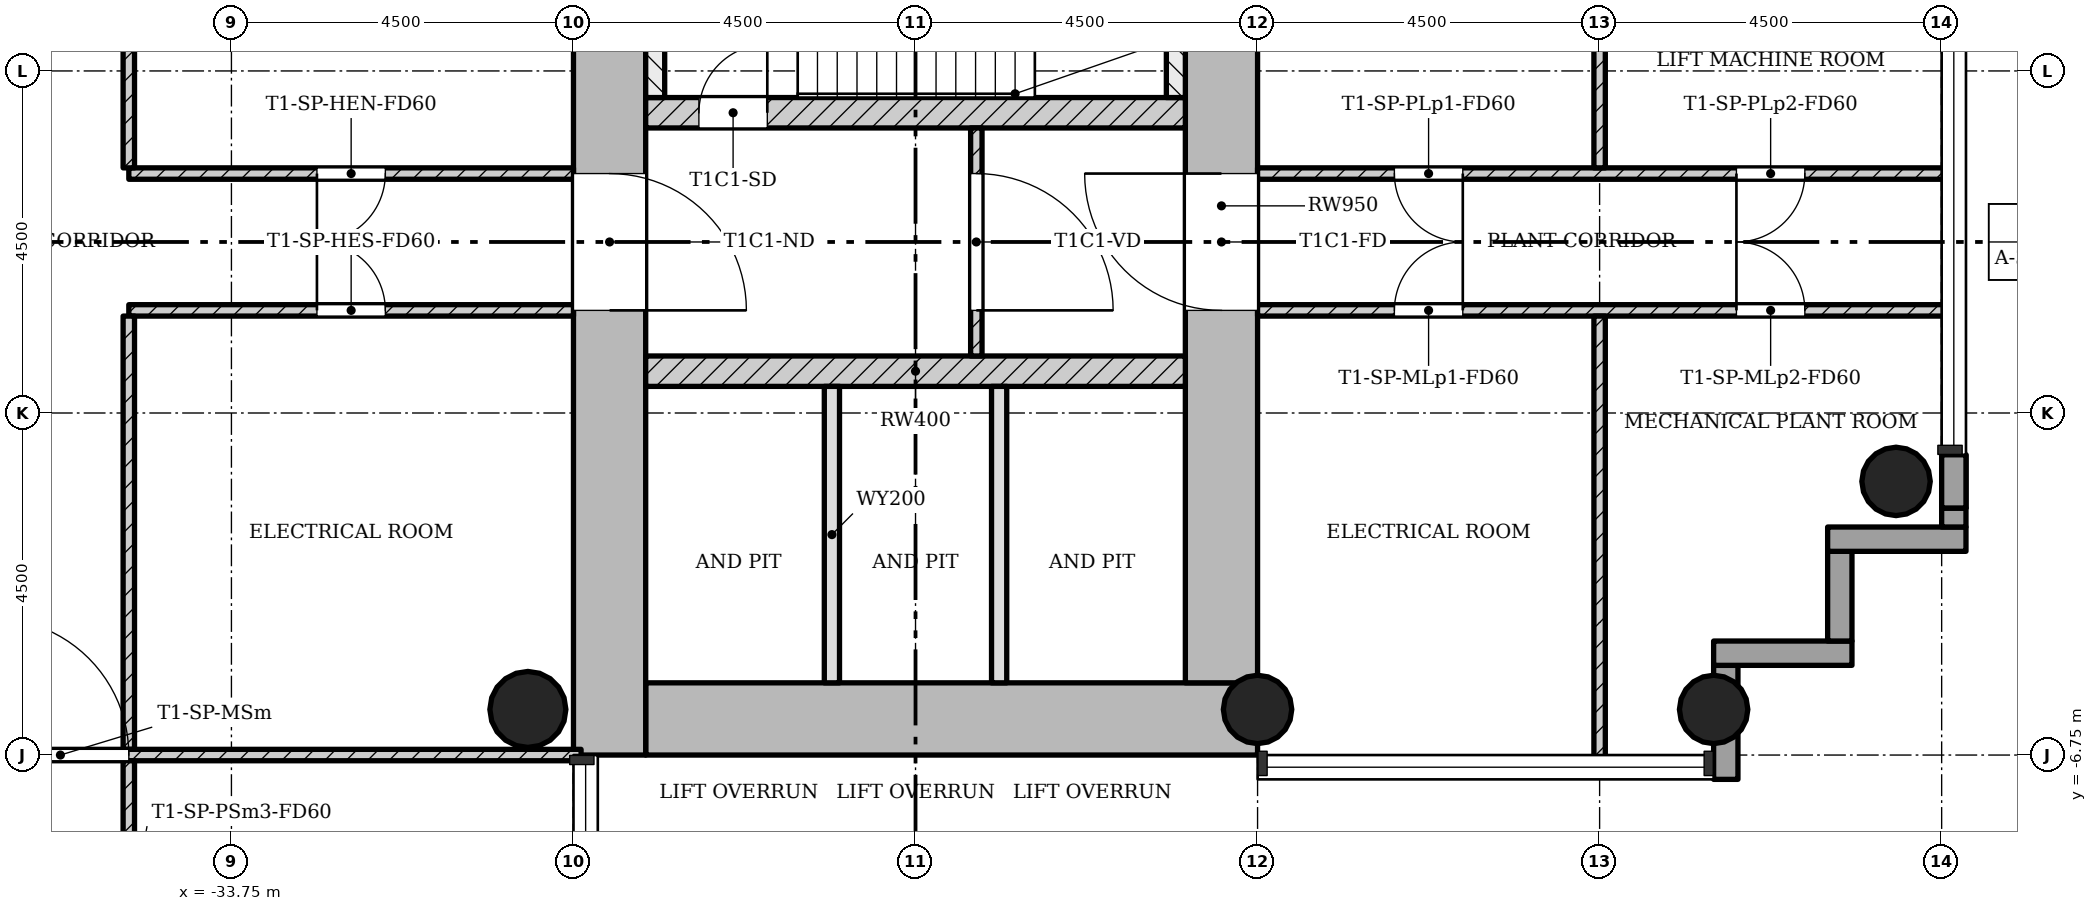
"""IFC4 building model, lengths in metres.
Left out: names, types, materials, properties, quantities, classifications, styles, units other than length and angle.
Written with IfcOpenShell. Run it as: python <this file> out.ifc"""

import sys

from ifc_helpers import new_model, si_unit, direction, frame, frame_2d, origin, origin_2d, place, context, subcontext, project, spatial, rectangle, hollow_circle, extrude, element, fill, save


model = new_model("IFC4")
c1 = context("Model", 3, precision=1e-05, world=origin(), true_north=direction((0.0, 1.0)))
c2 = subcontext(c1, "Body", "Model", "MODEL_VIEW")
j1 = project(units=[si_unit("LENGTHUNIT", "METRE"), si_unit("PLANEANGLEUNIT", "RADIAN")], contexts=[c1])
p1 = place(None, origin())
s1 = spatial("IfcSite", under=j1, at=p1, CompositionType="ELEMENT")
p2 = place(p1, origin())
s2 = spatial("IfcBuilding", under=s1, at=p2, CompositionType="ELEMENT")
p3 = place(p2, frame((0.0, 0.0, 124.2)))
s3 = spatial("IfcBuildingStorey", under=s2, at=p3, CompositionType="ELEMENT", Elevation=124.2)
p4 = place(p3, frame((-28.3, -6.275, 0.0), z_axis=(0.0, 0.0, 1.0), x_axis=(1.0, 0.0, 0.0)))
e1 = element("IfcWall", 1, at=p4, inside=s3, PredefinedType="SHEAR", context=c2, shape_type="SweptSolid", body=[
    extrude(rectangle(XDim=8.05, YDim=0.95, at=frame_2d((4.025, 0.0))), origin(), (0.0, 0.0, 1.0), 4.5),
])
p5 = place(p3, frame((-20.725, -5.8, 0.0), z_axis=(0.0, 0.0, 1.0), x_axis=(0.0, 1.0, 0.0)))
e2 = element("IfcWall", 2, at=p5, inside=s3, PredefinedType="SHEAR", context=c2, shape_type="SweptSolid", body=[
    extrude(rectangle(XDim=12.55, YDim=0.95, at=frame_2d((6.275, 0.0))), origin(), (0.0, 0.0, 1.0), 4.5),
])
p6 = place(p5, frame((4.9, 0.0, 0.0)))
e3 = element("IfcOpeningElement", 3, at=p6, cuts=e2, PredefinedType="OPENING", context=c2, shape_type="SweptSolid", body=[
    extrude(rectangle(XDim=1.8, YDim=2.1, at=frame_2d((0.9, 1.05))), frame((0.0, 0.485, 0.0), z_axis=(0.0, -1.0, 0.0), x_axis=(1.0, 0.0, 0.0)), (0.0, 0.0, 1.0), 0.97),
])
p7 = place(p3, frame((-28.775, 5.8, 0.0), z_axis=(0.0, 0.0, 1.0), x_axis=(0.0, -1.0, 0.0)))
e4 = element("IfcWall", 4, at=p7, inside=s3, PredefinedType="SHEAR", context=c2, shape_type="SweptSolid", body=[
    extrude(rectangle(XDim=12.55, YDim=0.95, at=frame_2d((6.275, 0.0))), origin(), (0.0, 0.0, 1.0), 4.5),
])
p8 = place(p7, frame((4.9, 0.0, 0.0)))
e5 = element("IfcOpeningElement", 5, at=p8, cuts=e4, PredefinedType="OPENING", context=c2, shape_type="SweptSolid", body=[
    extrude(rectangle(XDim=1.8, YDim=2.1, at=frame_2d((0.9, 1.05))), frame((0.0, 0.485, 0.0), z_axis=(0.0, -1.0, 0.0), x_axis=(1.0, 0.0, 0.0)), (0.0, 0.0, 1.0), 0.97),
])
p9 = place(p3, frame((-28.3, -1.7, 0.0), z_axis=(0.0, 0.0, 1.0), x_axis=(1.0, 0.0, 0.0)))
e6 = element("IfcWall", 6, at=p9, inside=s3, PredefinedType="SHEAR", context=c2, shape_type="SweptSolid", body=[
    extrude(rectangle(XDim=7.1, YDim=0.4, at=frame_2d((3.55, 0.0))), origin(), (0.0, 0.0, 1.0), 4.5),
])
p10 = place(p3, frame((-28.3, 1.7, 0.0), z_axis=(0.0, 0.0, 1.0), x_axis=(1.0, 0.0, 0.0)))
e7 = element("IfcWall", 7, at=p10, inside=s3, PredefinedType="SHEAR", context=c2, shape_type="SweptSolid", body=[
    extrude(rectangle(XDim=7.1, YDim=0.4, at=frame_2d((3.55, 0.0))), origin(), (0.0, 0.0, 1.0), 4.5),
])
p11 = place(p10, frame((0.7, 0.0, 0.0)))
e8 = element("IfcOpeningElement", 8, at=p11, cuts=e7, PredefinedType="OPENING", context=c2, shape_type="SweptSolid", body=[
    extrude(rectangle(XDim=0.9, YDim=2.1, at=frame_2d((0.45, 1.05))), frame((0.0, 0.21, 0.0), z_axis=(0.0, -1.0, 0.0), x_axis=(1.0, 0.0, 0.0)), (0.0, 0.0, 1.0), 0.42),
])
for number, where, z_axis, x_axis in (
    (9, (-20.25, -6.15, 0.0), (0.0, 0.0, 1.0), (1.0, 0.0, 0.0)),
    (10, (-14.25, -6.15, 0.0), (0.0, 0.0, 1.0), (1.0, 0.0, 0.0)),
    (11, (-11.85, -3.15, 0.0), (0.0, 0.0, 1.0), (1.0, 0.0, 0.0)),
):
    element("IfcColumn", number, at=place(p3, frame(where, z_axis=z_axis, x_axis=x_axis)), inside=s3, PredefinedType="COLUMN", context=c2, shape_type="SweptSolid", body=[
        extrude(hollow_circle(Radius=0.45, WallThickness=0.032, at=origin_2d()), origin(), (0.0, 0.0, 1.0), 4.5),
    ])
p12 = place(p3, frame((-29.85, -6.15, 0.0), z_axis=(0.0, 0.0, 1.0), x_axis=(1.0, 0.0, 0.0)))
e12 = element("IfcColumn", 12, at=p12, inside=s3, PredefinedType="COLUMN", context=c2, shape_type="SweptSolid", body=[
    extrude(hollow_circle(Radius=0.5, WallThickness=0.036, at=origin_2d()), origin(), (0.0, 0.0, 1.0), 4.5),
])
p13 = place(p3, frame((-14.09, -7.07, -0.3), z_axis=(0.0, 0.0, 1.0), x_axis=(0.0, 1.0, 0.0)))
e13 = element("IfcWall", 13, at=p13, inside=s3, PredefinedType="STANDARD", context=c2, shape_type="SweptSolid", body=[
    extrude(rectangle(XDim=1.5, YDim=0.32, at=frame_2d((0.75, 0.0))), origin(), (0.0, 0.0, 1.0), 4.5),
])
p14 = place(p3, frame((-14.25, -5.41, -0.3), z_axis=(0.0, 0.0, 1.0), x_axis=(1.0, 0.0, 0.0)))
e14 = element("IfcWall", 14, at=p14, inside=s3, PredefinedType="STANDARD", context=c2, shape_type="SweptSolid", body=[
    extrude(rectangle(XDim=1.82, YDim=0.32, at=frame_2d((0.91, 0.0))), origin(), (0.0, 0.0, 1.0), 4.5),
])
p15 = place(p3, frame((-12.59, -5.25, -0.3), z_axis=(0.0, 0.0, 1.0), x_axis=(0.0, 1.0, 0.0)))
e15 = element("IfcWall", 15, at=p15, inside=s3, PredefinedType="STANDARD", context=c2, shape_type="SweptSolid", body=[
    extrude(rectangle(XDim=1.18, YDim=0.32, at=frame_2d((0.59, 0.0))), origin(), (0.0, 0.0, 1.0), 4.5),
])
p16 = place(p3, frame((-12.75, -3.91, -0.3), z_axis=(0.0, 0.0, 1.0), x_axis=(1.0, 0.0, 0.0)))
e16 = element("IfcWall", 16, at=p16, inside=s3, PredefinedType="STANDARD", context=c2, shape_type="SweptSolid", body=[
    extrude(rectangle(XDim=1.82, YDim=0.32, at=frame_2d((0.91, 0.0))), origin(), (0.0, 0.0, 1.0), 4.5),
])
p17 = place(p3, frame((-11.09, -3.75, 0.0), z_axis=(0.0, 0.0, 1.0), x_axis=(0.0, 1.0, 0.0)))
e17 = element("IfcWall", 17, at=p17, inside=s3, PredefinedType="STANDARD", context=c2, shape_type="SweptSolid", body=[
    extrude(rectangle(XDim=0.25, YDim=0.32, at=frame_2d((0.125, 0.0))), origin(), (0.0, 0.0, 1.0), 4.2),
])
p18 = place(p3, frame((-11.09, -3.5, 0.0), z_axis=(0.0, 0.0, 1.0), x_axis=(0.0, 1.0, 0.0)))
e18 = element("IfcWall", 18, at=p18, inside=s3, PredefinedType="STANDARD", context=c2, shape_type="SweptSolid", body=[
    extrude(rectangle(XDim=0.7, YDim=0.32, at=frame_2d((0.35, 0.0))), origin(), (0.0, 0.0, 1.0), 3.61),
])
p19 = place(p3, frame((-11.09, -3.5, 4.08), z_axis=(0.0, 0.0, 1.0), x_axis=(0.0, 1.0, 0.0)))
e19 = element("IfcWall", 19, at=p19, inside=s3, PredefinedType="STANDARD", context=c2, shape_type="SweptSolid", body=[
    extrude(rectangle(XDim=0.7, YDim=0.32, at=frame_2d((0.35, 0.0))), origin(), (0.0, 0.0, 1.0), 0.12),
])
p20 = place(p3, frame((-23.95, -1.5, 0.0), z_axis=(0.0, 0.0, 1.0), x_axis=(0.0, 1.0, 0.0)))
e20 = element("IfcWall", 20, at=p20, inside=s3, PredefinedType="PARTITIONING", context=c2, shape_type="SweptSolid", body=[
    extrude(rectangle(XDim=3.0, YDim=0.15, at=frame_2d((1.5, 0.0))), origin(), (0.0, 0.0, 1.0), 4.1),
])
p21 = place(p20, frame((0.6, 0.0, 0.0)))
e21 = element("IfcOpeningElement", 21, at=p21, cuts=e20, PredefinedType="OPENING", context=c2, shape_type="SweptSolid", body=[
    extrude(rectangle(XDim=1.8, YDim=2.1, at=frame_2d((0.9, 1.05))), frame((0.0, 0.085, 0.0), z_axis=(0.0, -1.0, 0.0), x_axis=(1.0, 0.0, 0.0)), (0.0, 0.0, 1.0), 0.17),
])
for number, where, z_axis, x_axis in (
    (22, (-25.85, -5.8, 0.0), (0.0, 0.0, 1.0), (0.0, 1.0, 0.0)),
    (23, (-23.65, -5.8, 0.0), (0.0, 0.0, 1.0), (0.0, 1.0, 0.0)),
):
    element("IfcWall", number, at=place(p3, frame(where, z_axis=z_axis, x_axis=x_axis)), inside=s3, PredefinedType="SOLIDWALL", context=c2, shape_type="SweptSolid", body=[
        extrude(rectangle(XDim=3.9, YDim=0.2, at=frame_2d((1.95, 0.0))), origin(), (0.0, 0.0, 1.0), 4.1),
    ])
p22 = place(p3, frame((-35.1, 0.9, 0.0), z_axis=(0.0, 0.0, 1.0), x_axis=(1.0, 0.0, 0.0)))
e24 = element("IfcWall", 24, at=p22, inside=s3, PredefinedType="PARTITIONING", context=c2, shape_type="SweptSolid", body=[
    extrude(rectangle(XDim=5.85, YDim=0.15, at=frame_2d((2.925, 0.0))), origin(), (0.0, 0.0, 1.0), 4.1),
])
p23 = place(p22, frame((2.475, 0.0, 0.0)))
e25 = element("IfcOpeningElement", 25, at=p23, cuts=e24, PredefinedType="OPENING", context=c2, shape_type="SweptSolid", body=[
    extrude(rectangle(XDim=0.9, YDim=2.1, at=frame_2d((0.45, 1.05))), frame((0.0, 0.085, 0.0), z_axis=(0.0, -1.0, 0.0), x_axis=(1.0, 0.0, 0.0)), (0.0, 0.0, 1.0), 0.17),
])
p24 = place(p3, frame((-35.1, 0.975, 0.0), z_axis=(0.0, 0.0, 1.0), x_axis=(0.0, 1.0, 0.0)))
e26 = element("IfcWall", 26, at=p24, inside=s3, PredefinedType="PARTITIONING", context=c2, shape_type="SweptSolid", body=[
    extrude(rectangle(XDim=5.7, YDim=0.15, at=frame_2d((2.85, 0.0))), origin(), (0.0, 0.0, 1.0), 4.1),
])
p25 = place(p3, frame((-35.1, -0.9, 0.0), z_axis=(0.0, 0.0, 1.0), x_axis=(1.0, 0.0, 0.0)))
e27 = element("IfcWall", 27, at=p25, inside=s3, PredefinedType="PARTITIONING", context=c2, shape_type="SweptSolid", body=[
    extrude(rectangle(XDim=5.85, YDim=0.15, at=frame_2d((2.925, 0.0))), origin(), (0.0, 0.0, 1.0), 4.1),
])
p26 = place(p25, frame((2.475, 0.0, 0.0)))
e28 = element("IfcOpeningElement", 28, at=p26, cuts=e27, PredefinedType="OPENING", context=c2, shape_type="SweptSolid", body=[
    extrude(rectangle(XDim=0.9, YDim=2.1, at=frame_2d((0.45, 1.05))), frame((0.0, 0.085, 0.0), z_axis=(0.0, -1.0, 0.0), x_axis=(1.0, 0.0, 0.0)), (0.0, 0.0, 1.0), 0.17),
])
p27 = place(p3, frame((-35.1, -6.675, 0.0), z_axis=(0.0, 0.0, 1.0), x_axis=(0.0, 1.0, 0.0)))
e29 = element("IfcWall", 29, at=p27, inside=s3, PredefinedType="PARTITIONING", context=c2, shape_type="SweptSolid", body=[
    extrude(rectangle(XDim=5.7, YDim=0.15, at=frame_2d((2.85, 0.0))), origin(), (0.0, 0.0, 1.0), 4.1),
])
p28 = place(p3, frame((-20.25, 0.9, 0.0), z_axis=(0.0, 0.0, 1.0), x_axis=(1.0, 0.0, 0.0)))
e30 = element("IfcWall", 30, at=p28, inside=s3, PredefinedType="PARTITIONING", context=c2, shape_type="SweptSolid", body=[
    extrude(rectangle(XDim=9.1, YDim=0.15, at=frame_2d((4.55, 0.0))), origin(), (0.0, 0.0, 1.0), 4.1),
])
p29 = place(p28, frame((1.8, 0.0, 0.0)))
e31 = element("IfcOpeningElement", 31, at=p29, cuts=e30, PredefinedType="OPENING", context=c2, shape_type="SweptSolid", body=[
    extrude(rectangle(XDim=0.9, YDim=2.1, at=frame_2d((0.45, 1.05))), frame((0.0, 0.085, 0.0), z_axis=(0.0, -1.0, 0.0), x_axis=(1.0, 0.0, 0.0)), (0.0, 0.0, 1.0), 0.17),
])
p30 = place(p28, frame((6.3, 0.0, 0.0)))
e32 = element("IfcOpeningElement", 32, at=p30, cuts=e30, PredefinedType="OPENING", context=c2, shape_type="SweptSolid", body=[
    extrude(rectangle(XDim=0.9, YDim=2.1, at=frame_2d((0.45, 1.05))), frame((0.0, 0.085, 0.0), z_axis=(0.0, -1.0, 0.0), x_axis=(1.0, 0.0, 0.0)), (0.0, 0.0, 1.0), 0.17),
])
p31 = place(p3, frame((-15.75, 0.975, 0.0), z_axis=(0.0, 0.0, 1.0), x_axis=(0.0, 1.0, 0.0)))
e33 = element("IfcWall", 33, at=p31, inside=s3, PredefinedType="PARTITIONING", context=c2, shape_type="SweptSolid", body=[
    extrude(rectangle(XDim=5.875, YDim=0.15, at=frame_2d((2.938, 0.0))), origin(), (0.0, 0.0, 1.0), 4.1),
])
p32 = place(p3, frame((-20.25, -0.9, 0.0), z_axis=(0.0, 0.0, 1.0), x_axis=(1.0, 0.0, 0.0)))
e34 = element("IfcWall", 34, at=p32, inside=s3, PredefinedType="PARTITIONING", context=c2, shape_type="SweptSolid", body=[
    extrude(rectangle(XDim=9.1, YDim=0.15, at=frame_2d((4.55, 0.0))), origin(), (0.0, 0.0, 1.0), 4.1),
])
p33 = place(p32, frame((1.8, 0.0, 0.0)))
e35 = element("IfcOpeningElement", 35, at=p33, cuts=e34, PredefinedType="OPENING", context=c2, shape_type="SweptSolid", body=[
    extrude(rectangle(XDim=0.9, YDim=2.1, at=frame_2d((0.45, 1.05))), frame((0.0, 0.085, 0.0), z_axis=(0.0, -1.0, 0.0), x_axis=(1.0, 0.0, 0.0)), (0.0, 0.0, 1.0), 0.17),
])
p34 = place(p32, frame((6.3, 0.0, 0.0)))
e36 = element("IfcOpeningElement", 36, at=p34, cuts=e34, PredefinedType="OPENING", context=c2, shape_type="SweptSolid", body=[
    extrude(rectangle(XDim=0.9, YDim=2.1, at=frame_2d((0.45, 1.05))), frame((0.0, 0.085, 0.0), z_axis=(0.0, -1.0, 0.0), x_axis=(1.0, 0.0, 0.0)), (0.0, 0.0, 1.0), 0.17),
])
p35 = place(p3, frame((-15.75, -0.975, 0.0), z_axis=(0.0, 0.0, 1.0), x_axis=(0.0, -1.0, 0.0)))
e37 = element("IfcWall", 37, at=p35, inside=s3, PredefinedType="PARTITIONING", context=c2, shape_type="SweptSolid", body=[
    extrude(rectangle(XDim=5.875, YDim=0.15, at=frame_2d((2.938, 0.0))), origin(), (0.0, 0.0, 1.0), 4.1),
])
p36 = place(p3, frame((-42.85, -6.75, 0.0), z_axis=(0.0, 0.0, 1.0), x_axis=(1.0, 0.0, 0.0)))
e38 = element("IfcWall", 38, at=p36, inside=s3, PredefinedType="PARTITIONING", context=c2, shape_type="SweptSolid", body=[
    extrude(rectangle(XDim=13.7, YDim=0.15, at=frame_2d((6.85, 0.0))), origin(), (0.0, 0.0, 1.0), 4.1),
])
p37 = place(p36, frame((5.95, 0.0, 0.0)))
e39 = element("IfcOpeningElement", 39, at=p37, cuts=e38, PredefinedType="OPENING", context=c2, shape_type="SweptSolid", body=[
    extrude(rectangle(XDim=1.8, YDim=2.1, at=frame_2d((0.9, 1.05))), frame((0.0, 0.085, 0.0), z_axis=(0.0, -1.0, 0.0), x_axis=(1.0, 0.0, 0.0)), (0.0, 0.0, 1.0), 0.17),
])
p38 = place(p3, frame((-35.1, -20.35, 0.0), z_axis=(0.0, 0.0, 1.0), x_axis=(0.0, 1.0, 0.0)))
e40 = element("IfcWall", 40, at=p38, inside=s3, PredefinedType="PARTITIONING", context=c2, shape_type="SweptSolid", body=[
    extrude(rectangle(XDim=13.525, YDim=0.15, at=frame_2d((6.763, 0.0))), origin(), (0.0, 0.0, 1.0), 4.1),
])
p39 = place(p38, frame((1.9, 0.0, 0.0)))
e41 = element("IfcOpeningElement", 41, at=p39, cuts=e40, PredefinedType="OPENING", context=c2, shape_type="SweptSolid", body=[
    extrude(rectangle(XDim=0.9, YDim=2.1, at=frame_2d((0.45, 1.05))), frame((0.0, 0.085, 0.0), z_axis=(0.0, -1.0, 0.0), x_axis=(1.0, 0.0, 0.0)), (0.0, 0.0, 1.0), 0.17),
])
p40 = place(p38, frame((6.4, 0.0, 0.0)))
e42 = element("IfcOpeningElement", 42, at=p40, cuts=e40, PredefinedType="OPENING", context=c2, shape_type="SweptSolid", body=[
    extrude(rectangle(XDim=0.9, YDim=2.1, at=frame_2d((0.45, 1.05))), frame((0.0, 0.085, 0.0), z_axis=(0.0, -1.0, 0.0), x_axis=(1.0, 0.0, 0.0)), (0.0, 0.0, 1.0), 0.17),
])
p41 = place(p38, frame((10.9, 0.0, 0.0)))
e43 = element("IfcOpeningElement", 43, at=p41, cuts=e40, PredefinedType="OPENING", context=c2, shape_type="SweptSolid", body=[
    extrude(rectangle(XDim=0.9, YDim=2.1, at=frame_2d((0.45, 1.05))), frame((0.0, 0.085, 0.0), z_axis=(0.0, -1.0, 0.0), x_axis=(1.0, 0.0, 0.0)), (0.0, 0.0, 1.0), 0.17),
])
for number, where, z_axis, x_axis in (
    (44, (-21.325, 1.9, 0.0), (0.0, 0.0, 1.0), (0.0, 1.0, 0.0)),
    (45, (-28.175, 1.9, 0.0), (0.0, 0.0, 1.0), (0.0, 1.0, 0.0)),
):
    element("IfcWall", number, at=place(p3, frame(where, z_axis=z_axis, x_axis=x_axis)), inside=s3, PredefinedType="SHEAR", context=c2, shape_type="SweptSolid", body=[
        extrude(rectangle(XDim=3.9, YDim=0.25, at=frame_2d((1.95, 0.0))), origin(), (0.0, 0.0, 1.0), 4.5),
    ])
p42 = place(p21, origin())
e46 = element("IfcDoor", 46, at=p42, inside=s3, OperationType="SINGLE_SWING_LEFT", PredefinedType="DOOR", context=c2, shape_type="SweptSolid", body=[
    extrude(rectangle(XDim=1.8, YDim=2.1, at=frame_2d((0.9, 1.05))), frame((0.0, 0.025, 0.0), z_axis=(0.0, -1.0, 0.0), x_axis=(1.0, 0.0, 0.0)), (0.0, 0.0, 1.0), 0.05),
])
fill(e21, e46)
p43 = place(p23, origin())
e47 = element("IfcDoor", 47, at=p43, inside=s3, OperationType="SINGLE_SWING_LEFT", PredefinedType="DOOR", context=c2, shape_type="SweptSolid", body=[
    extrude(rectangle(XDim=0.9, YDim=2.1, at=frame_2d((0.45, 1.05))), frame((0.0, 0.025, 0.0), z_axis=(0.0, -1.0, 0.0), x_axis=(1.0, 0.0, 0.0)), (0.0, 0.0, 1.0), 0.05),
])
fill(e25, e47)
p44 = place(p26, origin())
e48 = element("IfcDoor", 48, at=p44, inside=s3, OperationType="SINGLE_SWING_RIGHT", PredefinedType="DOOR", context=c2, shape_type="SweptSolid", body=[
    extrude(rectangle(XDim=0.9, YDim=2.1, at=frame_2d((0.45, 1.05))), frame((0.0, 0.025, 0.0), z_axis=(0.0, -1.0, 0.0), x_axis=(1.0, 0.0, 0.0)), (0.0, 0.0, 1.0), 0.05),
])
fill(e28, e48)
p45 = place(p29, origin())
e49 = element("IfcDoor", 49, at=p45, inside=s3, OperationType="SINGLE_SWING_RIGHT", PredefinedType="DOOR", context=c2, shape_type="SweptSolid", body=[
    extrude(rectangle(XDim=0.9, YDim=2.1, at=frame_2d((0.45, 1.05))), frame((0.0, 0.025, 0.0), z_axis=(0.0, -1.0, 0.0), x_axis=(1.0, 0.0, 0.0)), (0.0, 0.0, 1.0), 0.05),
])
fill(e31, e49)
p46 = place(p30, origin())
e50 = element("IfcDoor", 50, at=p46, inside=s3, OperationType="SINGLE_SWING_LEFT", PredefinedType="DOOR", context=c2, shape_type="SweptSolid", body=[
    extrude(rectangle(XDim=0.9, YDim=2.1, at=frame_2d((0.45, 1.05))), frame((0.0, 0.025, 0.0), z_axis=(0.0, -1.0, 0.0), x_axis=(1.0, 0.0, 0.0)), (0.0, 0.0, 1.0), 0.05),
])
fill(e32, e50)
p47 = place(p33, origin())
e51 = element("IfcDoor", 51, at=p47, inside=s3, OperationType="SINGLE_SWING_LEFT", PredefinedType="DOOR", context=c2, shape_type="SweptSolid", body=[
    extrude(rectangle(XDim=0.9, YDim=2.1, at=frame_2d((0.45, 1.05))), frame((0.0, 0.025, 0.0), z_axis=(0.0, -1.0, 0.0), x_axis=(1.0, 0.0, 0.0)), (0.0, 0.0, 1.0), 0.05),
])
fill(e35, e51)
p48 = place(p34, origin())
e52 = element("IfcDoor", 52, at=p48, inside=s3, OperationType="SINGLE_SWING_RIGHT", PredefinedType="DOOR", context=c2, shape_type="SweptSolid", body=[
    extrude(rectangle(XDim=0.9, YDim=2.1, at=frame_2d((0.45, 1.05))), frame((0.0, 0.025, 0.0), z_axis=(0.0, -1.0, 0.0), x_axis=(1.0, 0.0, 0.0)), (0.0, 0.0, 1.0), 0.05),
])
fill(e36, e52)
p49 = place(p37, origin())
e53 = element("IfcDoor", 53, at=p49, inside=s3, OperationType="SINGLE_SWING_RIGHT", PredefinedType="DOOR", context=c2, shape_type="SweptSolid", body=[
    extrude(rectangle(XDim=1.8, YDim=2.1, at=frame_2d((0.9, 1.05))), frame((0.0, 0.025, 0.0), z_axis=(0.0, -1.0, 0.0), x_axis=(1.0, 0.0, 0.0)), (0.0, 0.0, 1.0), 0.05),
])
fill(e39, e53)
p50 = place(p11, origin())
e54 = element("IfcDoor", 54, at=p50, inside=s3, OperationType="SINGLE_SWING_LEFT", PredefinedType="DOOR", context=c2, shape_type="SweptSolid", body=[
    extrude(rectangle(XDim=0.9, YDim=2.1, at=frame_2d((0.45, 1.05))), frame((0.0, 0.025, 0.0), z_axis=(0.0, -1.0, 0.0), x_axis=(1.0, 0.0, 0.0)), (0.0, 0.0, 1.0), 0.05),
])
fill(e8, e54)
p51 = place(p8, origin())
e55 = element("IfcDoor", 55, at=p51, inside=s3, OperationType="SINGLE_SWING_LEFT", PredefinedType="DOOR", context=c2, shape_type="SweptSolid", body=[
    extrude(rectangle(XDim=1.8, YDim=2.1, at=frame_2d((0.9, 1.05))), frame((0.0, 0.025, 0.0), z_axis=(0.0, -1.0, 0.0), x_axis=(1.0, 0.0, 0.0)), (0.0, 0.0, 1.0), 0.05),
])
fill(e5, e55)
p52 = place(p6, origin())
e56 = element("IfcDoor", 56, at=p52, inside=s3, OperationType="SINGLE_SWING_LEFT", PredefinedType="DOOR", context=c2, shape_type="SweptSolid", body=[
    extrude(rectangle(XDim=1.8, YDim=2.1, at=frame_2d((0.9, 1.05))), frame((0.0, 0.025, 0.0), z_axis=(0.0, -1.0, 0.0), x_axis=(1.0, 0.0, 0.0)), (0.0, 0.0, 1.0), 0.05),
])
fill(e3, e56)
save(model, sys.argv[1])
